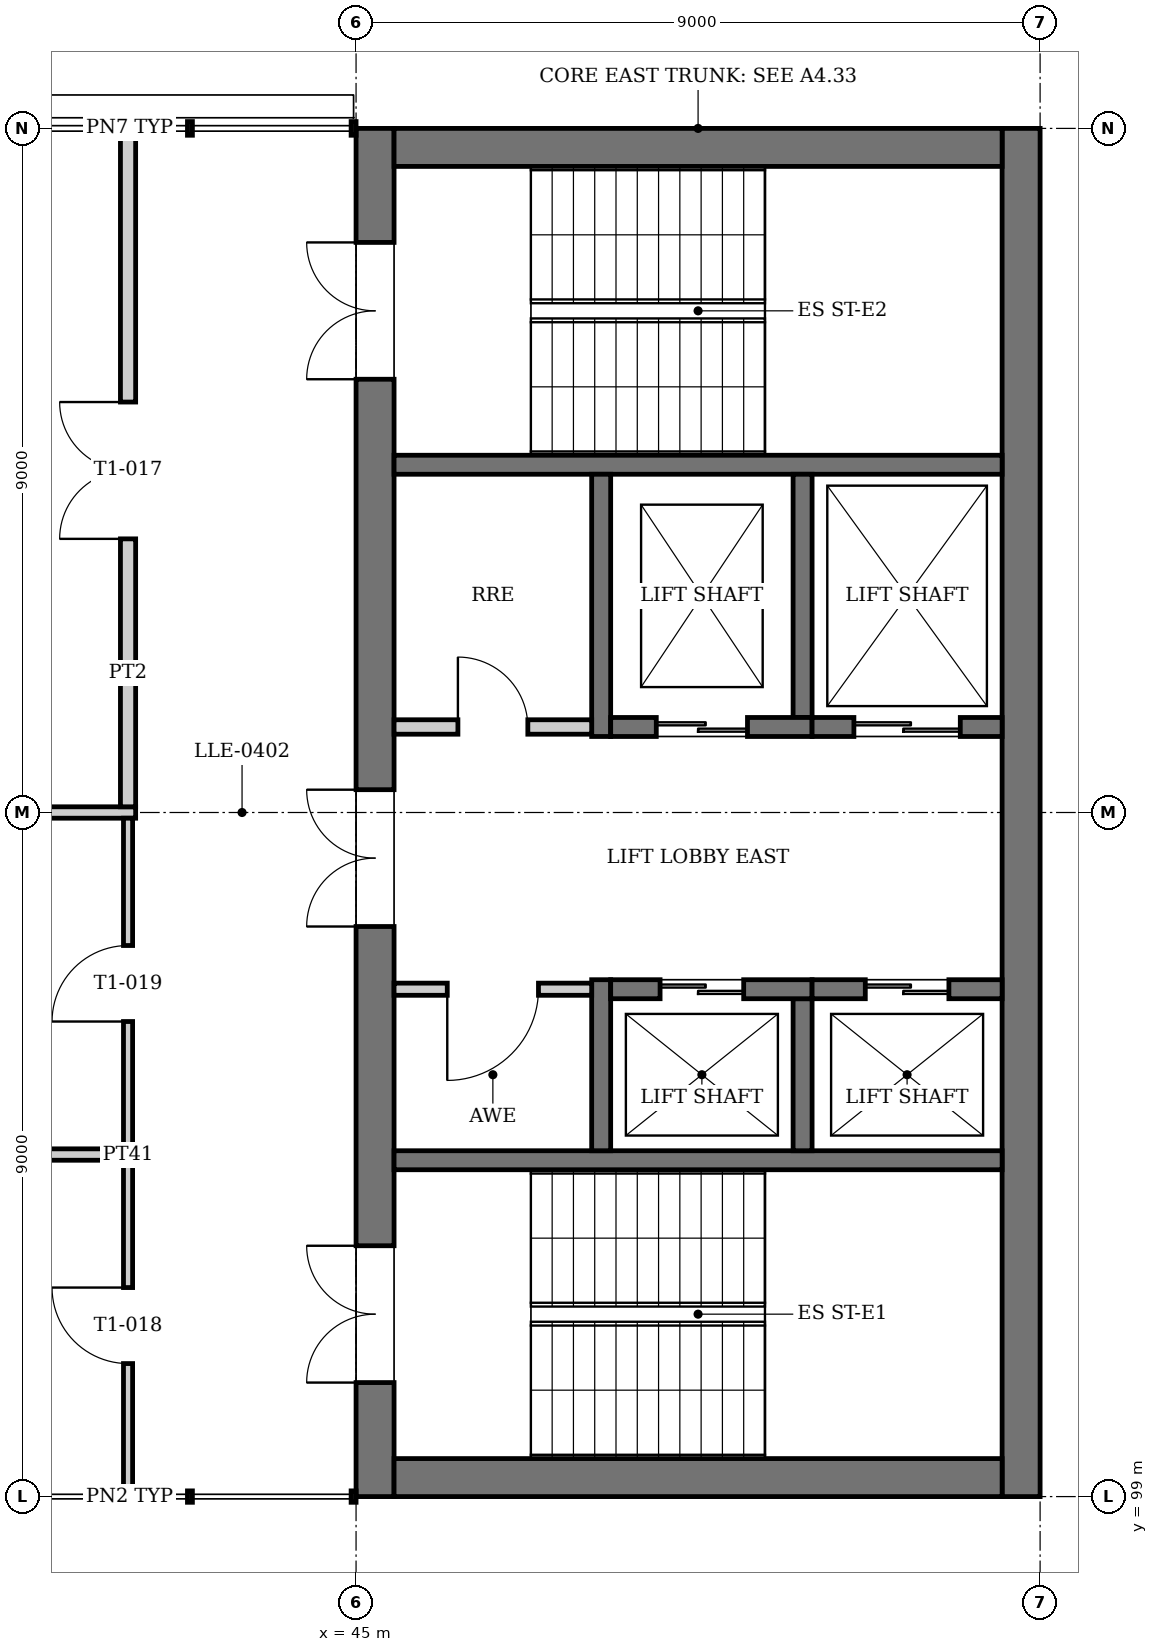
"""IFC4 building model, lengths in metres.
Left out: names, types, materials, properties, quantities, classifications, styles, units other than length and angle.
Written with IfcOpenShell. Run it as: python <this file> out.ifc"""

import sys

from ifc_helpers import new_model, si_unit, direction, frame, frame_2d, origin, place, context, subcontext, project, spatial, rectangle, extrude, element, fill, save


model = new_model("IFC4")
c1 = context("Model", 3, precision=1e-05, world=origin(), true_north=direction((0.0, 1.0)))
c2 = subcontext(c1, "Body", "Model", "MODEL_VIEW")
j1 = project(units=[si_unit("LENGTHUNIT", "METRE"), si_unit("PLANEANGLEUNIT", "RADIAN")], contexts=[c1])
p1 = place(None, origin())
s1 = spatial("IfcSite", under=j1, at=p1, CompositionType="ELEMENT")
p2 = place(p1, origin())
s2 = spatial("IfcBuilding", under=s1, at=p2, CompositionType="ELEMENT")
p3 = place(p2, frame((0.0, 0.0, 19.2)))
s3 = spatial("IfcBuildingStorey", under=s2, at=p3, CompositionType="ELEMENT", Elevation=19.2)
p4 = place(p3, frame((45.25, 99.0, 0.0), z_axis=(0.0, 0.0, 1.0), x_axis=(0.0, 1.0, 0.0)))
e1 = element("IfcWall", 1, at=p4, inside=s3, PredefinedType="SHEAR", context=c2, shape_type="SweptSolid", body=[
    extrude(rectangle(XDim=18.0, YDim=0.5, at=frame_2d((9.0, 0.0))), origin(), (0.0, 0.0, 1.0), 4.0),
])
p5 = place(p4, frame((1.5, 0.0, 0.0)))
e2 = element("IfcOpeningElement", 2, at=p5, cuts=e1, PredefinedType="OPENING", context=c2, shape_type="SweptSolid", body=[
    extrude(rectangle(XDim=1.8, YDim=2.1, at=frame_2d((0.9, 1.05))), frame((0.0, 0.26, 0.0), z_axis=(0.0, -1.0, 0.0), x_axis=(1.0, 0.0, 0.0)), (0.0, 0.0, 1.0), 0.52),
])
p6 = place(p4, frame((14.7, 0.0, 0.0)))
e3 = element("IfcOpeningElement", 3, at=p6, cuts=e1, PredefinedType="OPENING", context=c2, shape_type="SweptSolid", body=[
    extrude(rectangle(XDim=1.8, YDim=2.1, at=frame_2d((0.9, 1.05))), frame((0.0, 0.26, 0.0), z_axis=(0.0, -1.0, 0.0), x_axis=(1.0, 0.0, 0.0)), (0.0, 0.0, 1.0), 0.52),
])
p7 = place(p4, frame((7.5, 0.0, 0.0)))
e4 = element("IfcOpeningElement", 4, at=p7, cuts=e1, PredefinedType="OPENING", context=c2, shape_type="SweptSolid", body=[
    extrude(rectangle(XDim=1.8, YDim=2.1, at=frame_2d((0.9, 1.05))), frame((0.0, 0.26, 0.0), z_axis=(0.0, -1.0, 0.0), x_axis=(1.0, 0.0, 0.0)), (0.0, 0.0, 1.0), 0.52),
])
p8 = place(p3, frame((53.75, 99.0, 0.0), z_axis=(0.0, 0.0, 1.0), x_axis=(0.0, 1.0, 0.0)))
e5 = element("IfcWall", 5, at=p8, inside=s3, PredefinedType="SHEAR", context=c2, shape_type="SweptSolid", body=[
    extrude(rectangle(XDim=18.0, YDim=0.5, at=frame_2d((9.0, 0.0))), origin(), (0.0, 0.0, 1.0), 4.0),
])
for number, where, z_axis, x_axis in (
    (6, (45.5, 99.25, 0.0), (0.0, 0.0, 1.0), (1.0, 0.0, 0.0)),
    (7, (45.5, 116.75, 0.0), (0.0, 0.0, 1.0), (1.0, 0.0, 0.0)),
):
    element("IfcWall", number, at=place(p3, frame(where, z_axis=z_axis, x_axis=x_axis)), inside=s3, PredefinedType="SHEAR", context=c2, shape_type="SweptSolid", body=[
        extrude(rectangle(XDim=8.0, YDim=0.5, at=frame_2d((4.0, 0.0))), origin(), (0.0, 0.0, 1.0), 4.0),
    ])
for number, where, z_axis, x_axis in (
    (8, (45.5, 103.425, 0.0), (0.0, 0.0, 1.0), (1.0, 0.0, 0.0)),
    (9, (45.5, 112.575, 0.0), (0.0, 0.0, 1.0), (1.0, 0.0, 0.0)),
):
    element("IfcWall", number, at=place(p3, frame(where, z_axis=z_axis, x_axis=x_axis)), inside=s3, PredefinedType="SOLIDWALL", context=c2, shape_type="SweptSolid", body=[
        extrude(rectangle(XDim=8.0, YDim=0.25, at=frame_2d((4.0, 0.0))), origin(), (0.0, 0.0, 1.0), 3.75),
    ])
p9 = place(p3, frame((48.225, 103.55, 0.0), z_axis=(0.0, 0.0, 1.0), x_axis=(0.0, 1.0, 0.0)))
e10 = element("IfcWall", 10, at=p9, inside=s3, PredefinedType="SOLIDWALL", context=c2, shape_type="SweptSolid", body=[
    extrude(rectangle(XDim=2.25, YDim=0.25, at=frame_2d((1.125, 0.0))), origin(), (0.0, 0.0, 1.0), 4.0),
])
p10 = place(p3, frame((50.875, 103.55, 0.0), z_axis=(0.0, 0.0, 1.0), x_axis=(0.0, 1.0, 0.0)))
e11 = element("IfcWall", 11, at=p10, inside=s3, PredefinedType="SOLIDWALL", context=c2, shape_type="SweptSolid", body=[
    extrude(rectangle(XDim=2.0, YDim=0.25, at=frame_2d((1.0, 0.0))), origin(), (0.0, 0.0, 1.0), 4.0),
])
p11 = place(p3, frame((48.35, 105.675, 0.0), z_axis=(0.0, 0.0, 1.0), x_axis=(1.0, 0.0, 0.0)))
e12 = element("IfcWall", 12, at=p11, inside=s3, PredefinedType="SOLIDWALL", context=c2, shape_type="SweptSolid", body=[
    extrude(rectangle(XDim=2.65, YDim=0.25, at=frame_2d((1.325, 0.0))), origin(), (0.0, 0.0, 1.0), 4.0),
])
p12 = place(p11, frame((0.65, 0.0, 0.0)))
e13 = element("IfcOpeningElement", 13, at=p12, cuts=e12, PredefinedType="OPENING", context=c2, shape_type="SweptSolid", body=[
    extrude(rectangle(XDim=1.1, YDim=2.1, at=frame_2d((0.55, 1.05))), frame((0.0, 0.135, 0.0), z_axis=(0.0, -1.0, 0.0), x_axis=(1.0, 0.0, 0.0)), (0.0, 0.0, 1.0), 0.27),
])
p13 = place(p3, frame((51.0, 105.675, 0.0), z_axis=(0.0, 0.0, 1.0), x_axis=(1.0, 0.0, 0.0)))
e14 = element("IfcWall", 14, at=p13, inside=s3, PredefinedType="SOLIDWALL", context=c2, shape_type="SweptSolid", body=[
    extrude(rectangle(XDim=2.5, YDim=0.25, at=frame_2d((1.25, 0.0))), origin(), (0.0, 0.0, 1.0), 4.0),
])
p14 = place(p13, frame((0.7, 0.0, 0.0)))
e15 = element("IfcOpeningElement", 15, at=p14, cuts=e14, PredefinedType="OPENING", context=c2, shape_type="SweptSolid", body=[
    extrude(rectangle(XDim=1.1, YDim=2.1, at=frame_2d((0.55, 1.05))), frame((0.0, 0.135, 0.0), z_axis=(0.0, -1.0, 0.0), x_axis=(1.0, 0.0, 0.0)), (0.0, 0.0, 1.0), 0.27),
])
p15 = place(p3, frame((48.225, 109.0, 0.0), z_axis=(0.0, 0.0, 1.0), x_axis=(0.0, 1.0, 0.0)))
e16 = element("IfcWall", 16, at=p15, inside=s3, PredefinedType="SOLIDWALL", context=c2, shape_type="SweptSolid", body=[
    extrude(rectangle(XDim=3.45, YDim=0.25, at=frame_2d((1.725, 0.0))), origin(), (0.0, 0.0, 1.0), 4.0),
])
p16 = place(p3, frame((50.875, 109.25, 0.0), z_axis=(0.0, 0.0, 1.0), x_axis=(0.0, 1.0, 0.0)))
e17 = element("IfcWall", 17, at=p16, inside=s3, PredefinedType="SOLIDWALL", context=c2, shape_type="SweptSolid", body=[
    extrude(rectangle(XDim=3.2, YDim=0.25, at=frame_2d((1.6, 0.0))), origin(), (0.0, 0.0, 1.0), 4.0),
])
p17 = place(p3, frame((48.35, 109.125, 0.0), z_axis=(0.0, 0.0, 1.0), x_axis=(1.0, 0.0, 0.0)))
e18 = element("IfcWall", 18, at=p17, inside=s3, PredefinedType="SOLIDWALL", context=c2, shape_type="SweptSolid", body=[
    extrude(rectangle(XDim=2.65, YDim=0.25, at=frame_2d((1.325, 0.0))), origin(), (0.0, 0.0, 1.0), 4.0),
])
p18 = place(p17, frame((0.6, 0.0, 0.0)))
e19 = element("IfcOpeningElement", 19, at=p18, cuts=e18, PredefinedType="OPENING", context=c2, shape_type="SweptSolid", body=[
    extrude(rectangle(XDim=1.2, YDim=2.1, at=frame_2d((0.6, 1.05))), frame((0.0, 0.135, 0.0), z_axis=(0.0, -1.0, 0.0), x_axis=(1.0, 0.0, 0.0)), (0.0, 0.0, 1.0), 0.27),
])
p19 = place(p3, frame((51.0, 109.125, 0.0), z_axis=(0.0, 0.0, 1.0), x_axis=(1.0, 0.0, 0.0)))
e20 = element("IfcWall", 20, at=p19, inside=s3, PredefinedType="SOLIDWALL", context=c2, shape_type="SweptSolid", body=[
    extrude(rectangle(XDim=2.5, YDim=0.25, at=frame_2d((1.25, 0.0))), origin(), (0.0, 0.0, 1.0), 4.0),
])
p20 = place(p19, frame((0.55, 0.0, 0.0)))
e21 = element("IfcOpeningElement", 21, at=p20, cuts=e20, PredefinedType="OPENING", context=c2, shape_type="SweptSolid", body=[
    extrude(rectangle(XDim=1.4, YDim=2.4, at=frame_2d((0.7, 1.2))), frame((0.0, 0.135, 0.0), z_axis=(0.0, -1.0, 0.0), x_axis=(1.0, 0.0, 0.0)), (0.0, 0.0, 1.0), 0.27),
])
p21 = place(p3, frame((45.5, 105.675, 0.0), z_axis=(0.0, 0.0, 1.0), x_axis=(1.0, 0.0, 0.0)))
e22 = element("IfcWall", 22, at=p21, inside=s3, PredefinedType="PARTITIONING", context=c2, shape_type="SweptSolid", body=[
    extrude(rectangle(XDim=2.6, YDim=0.16, at=frame_2d((1.3, 0.0))), origin(), (0.0, 0.0, 1.0), 3.75),
])
p22 = place(p21, frame((0.7, 0.0, 0.0)))
e23 = element("IfcOpeningElement", 23, at=p22, cuts=e22, PredefinedType="OPENING", context=c2, shape_type="SweptSolid", body=[
    extrude(rectangle(XDim=1.2, YDim=2.1, at=frame_2d((0.6, 1.05))), frame((0.0, 0.09, 0.0), z_axis=(0.0, -1.0, 0.0), x_axis=(1.0, 0.0, 0.0)), (0.0, 0.0, 1.0), 0.18),
])
p23 = place(p3, frame((45.5, 109.125, 0.0), z_axis=(0.0, 0.0, 1.0), x_axis=(1.0, 0.0, 0.0)))
e24 = element("IfcWall", 24, at=p23, inside=s3, PredefinedType="PARTITIONING", context=c2, shape_type="SweptSolid", body=[
    extrude(rectangle(XDim=2.6, YDim=0.19, at=frame_2d((1.3, 0.0))), origin(), (0.0, 0.0, 1.0), 3.75),
])
p24 = place(p23, frame((0.84, 0.0, 0.0)))
e25 = element("IfcOpeningElement", 25, at=p24, cuts=e24, PredefinedType="OPENING", context=c2, shape_type="SweptSolid", body=[
    extrude(rectangle(XDim=0.92, YDim=2.1, at=frame_2d((0.46, 1.05))), frame((0.0, 0.105, 0.0), z_axis=(0.0, -1.0, 0.0), x_axis=(1.0, 0.0, 0.0)), (0.0, 0.0, 1.0), 0.21),
])
p25 = place(p3, frame((32.925, 103.5, 0.0), z_axis=(0.0, 0.0, 1.0), x_axis=(1.0, 0.0, 0.0)))
e26 = element("IfcWall", 26, at=p25, inside=s3, PredefinedType="PARTITIONING", context=c2, shape_type="SweptSolid", body=[
    extrude(rectangle(XDim=9.015, YDim=0.15, at=frame_2d((4.507, 0.0))), origin(), (0.0, 0.0, 1.0), 3.05),
])
p26 = place(p3, frame((32.925, 108.0, 0.0), z_axis=(0.0, 0.0, 1.0), x_axis=(1.0, 0.0, 0.0)))
e27 = element("IfcWall", 27, at=p26, inside=s3, PredefinedType="PARTITIONING", context=c2, shape_type="SweptSolid", body=[
    extrude(rectangle(XDim=9.175, YDim=0.15, at=frame_2d((4.587, 0.0))), origin(), (0.0, 0.0, 1.0), 3.05),
])
p27 = place(p3, frame((42.0, 99.075, 0.0), z_axis=(0.0, 0.0, 1.0), x_axis=(0.0, 1.0, 0.0)))
e28 = element("IfcWall", 28, at=p27, inside=s3, PredefinedType="PARTITIONING", context=c2, shape_type="SweptSolid", body=[
    extrude(rectangle(XDim=8.85, YDim=0.12, at=frame_2d((4.425, 0.0))), origin(), (0.0, 0.0, 1.0), 3.85),
])
p28 = place(p27, frame((1.675, 0.0, 0.0)))
e29 = element("IfcOpeningElement", 29, at=p28, cuts=e28, PredefinedType="OPENING", context=c2, shape_type="SweptSolid", body=[
    extrude(rectangle(XDim=1.0, YDim=2.1, at=frame_2d((0.5, 1.05))), frame((0.0, 0.07, 0.0), z_axis=(0.0, -1.0, 0.0), x_axis=(1.0, 0.0, 0.0)), (0.0, 0.0, 1.0), 0.14),
])
p29 = place(p27, frame((6.175, 0.0, 0.0)))
e30 = element("IfcOpeningElement", 30, at=p29, cuts=e28, PredefinedType="OPENING", context=c2, shape_type="SweptSolid", body=[
    extrude(rectangle(XDim=1.0, YDim=2.1, at=frame_2d((0.5, 1.05))), frame((0.0, 0.07, 0.0), z_axis=(0.0, -1.0, 0.0), x_axis=(1.0, 0.0, 0.0)), (0.0, 0.0, 1.0), 0.14),
])
p30 = place(p3, frame((42.0, 108.075, 0.0), z_axis=(0.0, 0.0, 1.0), x_axis=(0.0, 1.0, 0.0)))
e31 = element("IfcWall", 31, at=p30, inside=s3, PredefinedType="PARTITIONING", context=c2, shape_type="SweptSolid", body=[
    extrude(rectangle(XDim=8.835, YDim=0.2, at=frame_2d((4.417, 0.0))), origin(), (0.0, 0.0, 1.0), 3.85),
])
p31 = place(p30, frame((3.525, 0.0, 0.0)))
e32 = element("IfcOpeningElement", 32, at=p31, cuts=e31, PredefinedType="OPENING", context=c2, shape_type="SweptSolid", body=[
    extrude(rectangle(XDim=1.8, YDim=2.1, at=frame_2d((0.9, 1.05))), frame((0.0, 0.11, 0.0), z_axis=(0.0, -1.0, 0.0), x_axis=(1.0, 0.0, 0.0)), (0.0, 0.0, 1.0), 0.22),
])
p32 = place(p12, origin())
e33 = element("IfcDoor", 33, at=p32, inside=s3, OperationType="DOUBLE_DOOR_SLIDING", PredefinedType="DOOR", context=c2, shape_type="SweptSolid", body=[
    extrude(rectangle(XDim=1.1, YDim=2.1, at=frame_2d((0.55, 1.05))), frame((0.0, 0.025, 0.0), z_axis=(0.0, -1.0, 0.0), x_axis=(1.0, 0.0, 0.0)), (0.0, 0.0, 1.0), 0.05),
])
fill(e13, e33)
p33 = place(p14, origin())
e34 = element("IfcDoor", 34, at=p33, inside=s3, OperationType="DOUBLE_DOOR_SLIDING", PredefinedType="DOOR", context=c2, shape_type="SweptSolid", body=[
    extrude(rectangle(XDim=1.1, YDim=2.1, at=frame_2d((0.55, 1.05))), frame((0.0, 0.025, 0.0), z_axis=(0.0, -1.0, 0.0), x_axis=(1.0, 0.0, 0.0)), (0.0, 0.0, 1.0), 0.05),
])
fill(e15, e34)
p34 = place(p18, origin())
e35 = element("IfcDoor", 35, at=p34, inside=s3, OperationType="DOUBLE_DOOR_SLIDING", PredefinedType="DOOR", context=c2, shape_type="SweptSolid", body=[
    extrude(rectangle(XDim=1.2, YDim=2.1, at=frame_2d((0.6, 1.05))), frame((0.0, 0.025, 0.0), z_axis=(0.0, -1.0, 0.0), x_axis=(1.0, 0.0, 0.0)), (0.0, 0.0, 1.0), 0.05),
])
fill(e19, e35)
p35 = place(p20, origin())
e36 = element("IfcDoor", 36, at=p35, inside=s3, OperationType="DOUBLE_DOOR_SLIDING", PredefinedType="DOOR", context=c2, shape_type="SweptSolid", body=[
    extrude(rectangle(XDim=1.4, YDim=2.4, at=frame_2d((0.7, 1.2))), frame((0.0, 0.025, 0.0), z_axis=(0.0, -1.0, 0.0), x_axis=(1.0, 0.0, 0.0)), (0.0, 0.0, 1.0), 0.05),
])
fill(e21, e36)
p36 = place(p31, origin())
e37 = element("IfcDoor", 37, at=p36, inside=s3, OperationType="DOUBLE_DOOR_SINGLE_SWING", PredefinedType="DOOR", context=c2, shape_type="SweptSolid", body=[
    extrude(rectangle(XDim=1.8, YDim=2.1, at=frame_2d((0.9, 1.05))), frame((0.0, 0.025, 0.0), z_axis=(0.0, -1.0, 0.0), x_axis=(1.0, 0.0, 0.0)), (0.0, 0.0, 1.0), 0.05),
])
fill(e32, e37)
p37 = place(p28, origin())
e38 = element("IfcDoor", 38, at=p37, inside=s3, OperationType="SINGLE_SWING_RIGHT", PredefinedType="DOOR", context=c2, shape_type="SweptSolid", body=[
    extrude(rectangle(XDim=1.0, YDim=2.1, at=frame_2d((0.5, 1.05))), frame((0.0, 0.025, 0.0), z_axis=(0.0, -1.0, 0.0), x_axis=(1.0, 0.0, 0.0)), (0.0, 0.0, 1.0), 0.05),
])
fill(e29, e38)
p38 = place(p29, origin())
e39 = element("IfcDoor", 39, at=p38, inside=s3, OperationType="SINGLE_SWING_LEFT", PredefinedType="DOOR", context=c2, shape_type="SweptSolid", body=[
    extrude(rectangle(XDim=1.0, YDim=2.1, at=frame_2d((0.5, 1.05))), frame((0.0, 0.025, 0.0), z_axis=(0.0, -1.0, 0.0), x_axis=(1.0, 0.0, 0.0)), (0.0, 0.0, 1.0), 0.05),
])
fill(e30, e39)
p39 = place(p5, origin())
e40 = element("IfcDoor", 40, at=p39, inside=s3, OperationType="DOUBLE_DOOR_SINGLE_SWING", PredefinedType="DOOR", context=c2, shape_type="SweptSolid", body=[
    extrude(rectangle(XDim=1.8, YDim=2.1, at=frame_2d((0.9, 1.05))), frame((0.0, 0.025, 0.0), z_axis=(0.0, -1.0, 0.0), x_axis=(1.0, 0.0, 0.0)), (0.0, 0.0, 1.0), 0.05),
])
fill(e2, e40)
p40 = place(p6, origin())
e41 = element("IfcDoor", 41, at=p40, inside=s3, OperationType="DOUBLE_DOOR_SINGLE_SWING", PredefinedType="DOOR", context=c2, shape_type="SweptSolid", body=[
    extrude(rectangle(XDim=1.8, YDim=2.1, at=frame_2d((0.9, 1.05))), frame((0.0, 0.025, 0.0), z_axis=(0.0, -1.0, 0.0), x_axis=(1.0, 0.0, 0.0)), (0.0, 0.0, 1.0), 0.05),
])
fill(e3, e41)
p41 = place(p7, origin())
e42 = element("IfcDoor", 42, at=p41, inside=s3, OperationType="DOUBLE_DOOR_SINGLE_SWING", PredefinedType="DOOR", context=c2, shape_type="SweptSolid", body=[
    extrude(rectangle(XDim=1.8, YDim=2.1, at=frame_2d((0.9, 1.05))), frame((0.0, 0.025, 0.0), z_axis=(0.0, -1.0, 0.0), x_axis=(1.0, 0.0, 0.0)), (0.0, 0.0, 1.0), 0.05),
])
fill(e4, e42)
p42 = place(p22, frame((1.2, 0.0, 0.0), z_axis=(0.0, 0.0, 1.0), x_axis=(-1.0, 0.0, 0.0)))
e43 = element("IfcDoor", 43, at=p42, inside=s3, OperationType="SINGLE_SWING_RIGHT", PredefinedType="DOOR", context=c2, shape_type="SweptSolid", body=[
    extrude(rectangle(XDim=1.2, YDim=2.1, at=frame_2d((0.6, 1.05))), frame((0.0, 0.025, 0.0), z_axis=(0.0, -1.0, 0.0), x_axis=(1.0, 0.0, 0.0)), (0.0, 0.0, 1.0), 0.05),
])
fill(e23, e43)
p43 = place(p24, origin())
e44 = element("IfcDoor", 44, at=p43, inside=s3, OperationType="SINGLE_SWING_LEFT", PredefinedType="DOOR", context=c2, shape_type="SweptSolid", body=[
    extrude(rectangle(XDim=0.92, YDim=2.1, at=frame_2d((0.46, 1.05))), frame((0.0, 0.025, 0.0), z_axis=(0.0, -1.0, 0.0), x_axis=(1.0, 0.0, 0.0)), (0.0, 0.0, 1.0), 0.05),
])
fill(e25, e44)
save(model, sys.argv[1])
